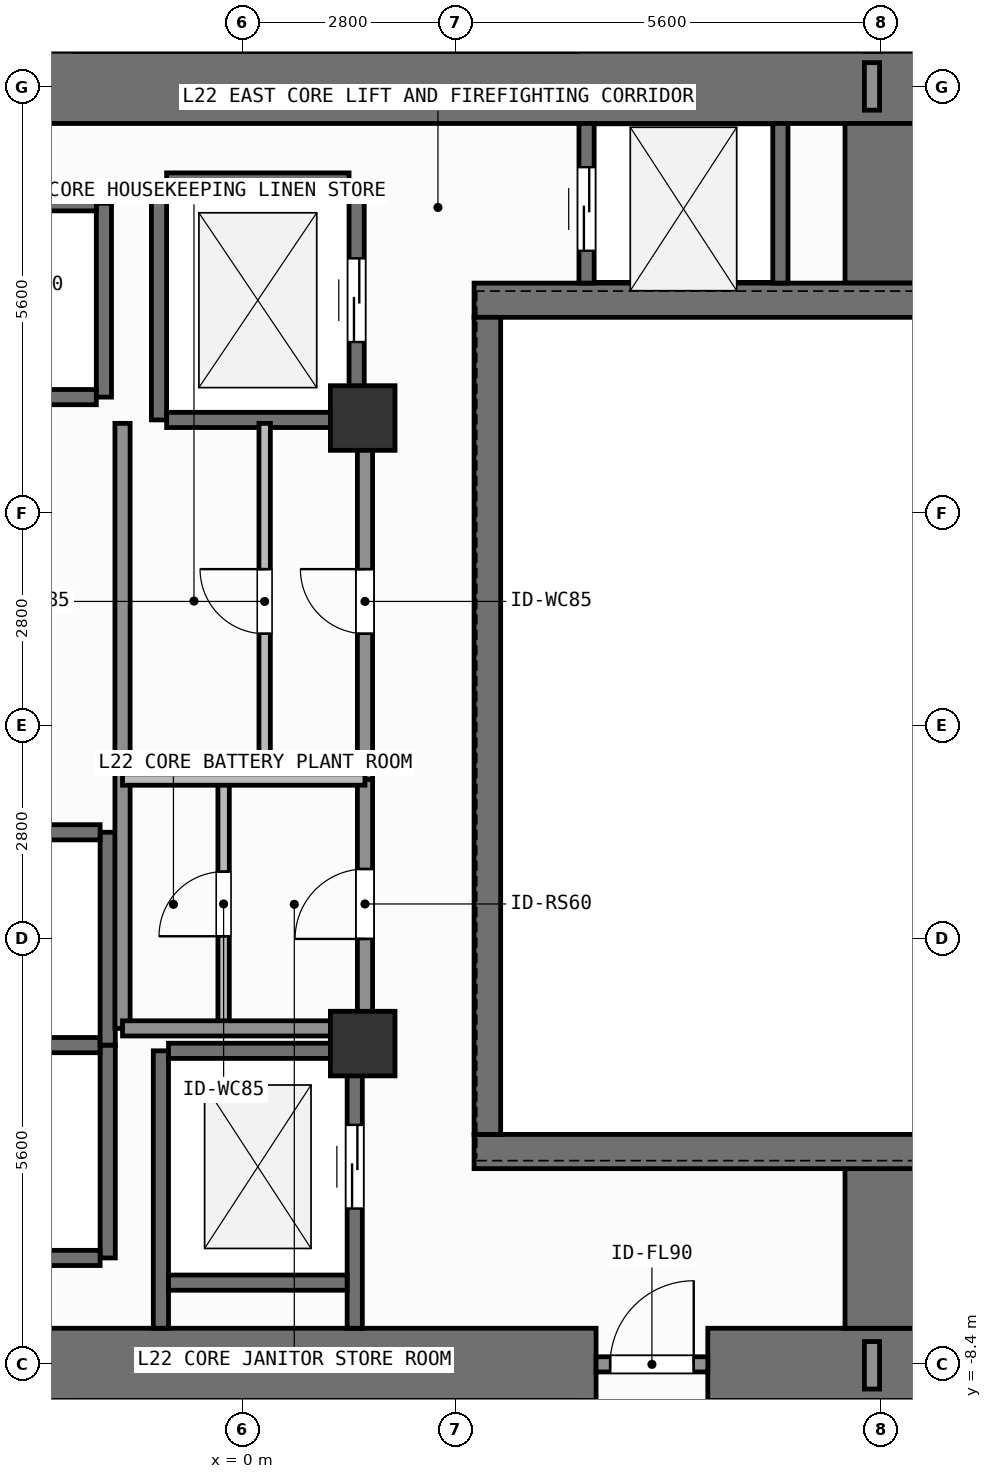
"""IFC4 building model, lengths in metres.
Left out: names, types, materials, properties, quantities, classifications, styles, units other than length and angle.
Written with IfcOpenShell. Run it as: python <this file> out.ifc"""

import sys

from ifc_helpers import new_model, si_unit, direction, frame, frame_2d, origin, origin_2d, place, context, subcontext, project, spatial, rectangle, extrude, element, fill, save


model = new_model("IFC4")
c1 = context("Model", 3, precision=1e-05, world=origin(), true_north=direction((0.0, 1.0)))
c2 = subcontext(c1, "Body", "Model", "MODEL_VIEW")
j1 = project(units=[si_unit("LENGTHUNIT", "METRE"), si_unit("PLANEANGLEUNIT", "RADIAN")], contexts=[c1])
p1 = place(None, origin())
s1 = spatial("IfcSite", under=j1, at=p1, CompositionType="ELEMENT")
p2 = place(p1, origin())
s2 = spatial("IfcBuilding", under=s1, at=p2, CompositionType="ELEMENT")
p3 = place(p2, frame((0.0, 0.0, 89.1)))
s3 = spatial("IfcBuildingStorey", under=s2, at=p3, CompositionType="ELEMENT", Elevation=89.1)
p4 = place(p3, frame((-2.62, -8.4, 0.0), z_axis=(0.0, 0.0, 1.0), x_axis=(1.0, 0.0, 0.0)))
e1 = element("IfcWall", 1, at=p4, inside=s3, PredefinedType="SHEAR", context=c2, shape_type="SweptSolid", body=[
    extrude(rectangle(XDim=7.27, YDim=0.95, at=frame_2d((3.635, 0.0))), origin(), (0.0, 0.0, 1.0), 3.9),
])
p5 = place(p3, frame((6.12, -8.4, 0.0), z_axis=(0.0, 0.0, 1.0), x_axis=(1.0, 0.0, 0.0)))
e2 = element("IfcWall", 2, at=p5, inside=s3, PredefinedType="SHEAR", context=c2, shape_type="SweptSolid", body=[
    extrude(rectangle(XDim=2.755, YDim=0.95, at=frame_2d((1.377, 0.0))), origin(), (0.0, 0.0, 1.0), 3.9),
])
p6 = place(p3, frame((-7.55, 8.4, 0.0), z_axis=(0.0, 0.0, 1.0), x_axis=(1.0, 0.0, 0.0)))
e3 = element("IfcWall", 3, at=p6, inside=s3, PredefinedType="SHEAR", context=c2, shape_type="SweptSolid", body=[
    extrude(rectangle(XDim=16.425, YDim=0.95, at=frame_2d((8.212, 0.0))), origin(), (0.0, 0.0, 1.0), 3.9),
])
for number, where, z_axis, x_axis in (
    (4, (8.4, -7.925, 0.0), (0.0, 0.0, 1.0), (0.0, 1.0, 0.0)),
    (5, (8.4, 5.825, 0.0), (0.0, 0.0, 1.0), (0.0, 1.0, 0.0)),
):
    element("IfcWall", number, at=place(p3, frame(where, z_axis=z_axis, x_axis=x_axis)), inside=s3, PredefinedType="SHEAR", context=c2, shape_type="SweptSolid", body=[
        extrude(rectangle(XDim=2.1, YDim=0.95, at=frame_2d((1.05, 0.0))), origin(), (0.0, 0.0, 1.0), 3.9),
    ])
for number, where, z_axis, x_axis in (
    (6, (3.045, -5.6, 0.0), (0.0, 0.0, 1.0), (1.0, 0.0, 0.0)),
    (7, (3.045, 5.6, 0.0), (0.0, 0.0, 1.0), (1.0, 0.0, 0.0)),
):
    element("IfcWall", number, at=place(p3, frame(where, z_axis=z_axis, x_axis=x_axis)), inside=s3, PredefinedType="SHEAR", context=c2, shape_type="SweptSolid", body=[
        extrude(rectangle(XDim=5.83, YDim=0.45, at=frame_2d((2.915, 0.0))), origin(), (0.0, 0.0, 1.0), 3.9),
    ])
p7 = place(p3, frame((3.22, -5.375, 0.0), z_axis=(0.0, 0.0, 1.0), x_axis=(0.0, 1.0, 0.0)))
e8 = element("IfcWall", 8, at=p7, inside=s3, PredefinedType="SHEAR", context=c2, shape_type="SweptSolid", body=[
    extrude(rectangle(XDim=10.75, YDim=0.35, at=frame_2d((5.375, 0.0))), origin(), (0.0, 0.0, 1.0), 3.9),
])
for number, where, z_axis, x_axis in (
    (9, (1.58, -4.18, 0.0), (0.0, 0.0, 1.0), (1.0, 0.0, 0.0)),
    (10, (1.58, 4.05, 0.0), (0.0, 0.0, 1.0), (1.0, 0.0, 0.0)),
):
    element("IfcColumn", number, at=place(p3, frame(where, z_axis=z_axis, x_axis=x_axis)), inside=s3, PredefinedType="COLUMN", context=c2, shape_type="SweptSolid", body=[
        extrude(rectangle(XDim=0.85, YDim=0.85, at=origin_2d()), origin(), (0.0, 0.0, 1.0), 3.9),
    ])
p8 = place(p3, frame((-1.825, 4.325, 0.0), z_axis=(0.0, 0.0, 1.0), x_axis=(0.0, 1.0, 0.0)))
e11 = element("IfcWall", 11, at=p8, inside=s3, PredefinedType="SHEAR", context=c2, shape_type="SweptSolid", body=[
    extrude(rectangle(XDim=2.55, YDim=0.2, at=frame_2d((1.275, 0.0))), origin(), (0.0, 0.0, 1.0), 3.68),
])
for number, where, z_axis, x_axis in (
    (12, (-4.275, 4.325, 0.0), (0.0, 0.0, 1.0), (1.0, 0.0, 0.0)),
    (13, (-4.275, 6.875, 0.0), (0.0, 0.0, 1.0), (1.0, 0.0, 0.0)),
):
    element("IfcWall", number, at=place(p3, frame(where, z_axis=z_axis, x_axis=x_axis)), inside=s3, PredefinedType="SHEAR", context=c2, shape_type="SweptSolid", body=[
        extrude(rectangle(XDim=2.35, YDim=0.2, at=frame_2d((1.175, 0.0))), origin(), (0.0, 0.0, 1.0), 3.68),
    ])
p9 = place(p3, frame((-1.775, -7.0, 0.0), z_axis=(0.0, 0.0, 1.0), x_axis=(0.0, 1.0, 0.0)))
e14 = element("IfcWall", 14, at=p9, inside=s3, PredefinedType="SHEAR", context=c2, shape_type="SweptSolid", body=[
    extrude(rectangle(XDim=2.8, YDim=0.2, at=frame_2d((1.4, 0.0))), origin(), (0.0, 0.0, 1.0), 3.68),
])
for number, where, z_axis, x_axis in (
    (15, (-4.325, -7.0, 0.0), (0.0, 0.0, 1.0), (1.0, 0.0, 0.0)),
    (16, (-4.325, -4.2, 0.0), (0.0, 0.0, 1.0), (1.0, 0.0, 0.0)),
):
    element("IfcWall", number, at=place(p3, frame(where, z_axis=z_axis, x_axis=x_axis)), inside=s3, PredefinedType="SHEAR", context=c2, shape_type="SweptSolid", body=[
        extrude(rectangle(XDim=2.45, YDim=0.2, at=frame_2d((1.225, 0.0))), origin(), (0.0, 0.0, 1.0), 3.68),
    ])
p10 = place(p3, frame((-1.775, -4.2, 0.0), z_axis=(0.0, 0.0, 1.0), x_axis=(0.0, 1.0, 0.0)))
e17 = element("IfcWall", 17, at=p10, inside=s3, PredefinedType="SHEAR", context=c2, shape_type="SweptSolid", body=[
    extrude(rectangle(XDim=2.8, YDim=0.2, at=frame_2d((1.4, 0.0))), origin(), (0.0, 0.0, 1.0), 3.68),
])
p11 = place(p3, frame((-4.325, -1.4, 0.0), z_axis=(0.0, 0.0, 1.0), x_axis=(1.0, 0.0, 0.0)))
e18 = element("IfcWall", 18, at=p11, inside=s3, PredefinedType="SHEAR", context=c2, shape_type="SweptSolid", body=[
    extrude(rectangle(XDim=2.45, YDim=0.2, at=frame_2d((1.225, 0.0))), origin(), (0.0, 0.0, 1.0), 3.68),
])
p12 = place(p3, frame((-1.1, 4.025, 0.0), z_axis=(0.0, 0.0, 1.0), x_axis=(0.0, 1.0, 0.0)))
e19 = element("IfcWall", 19, at=p12, inside=s3, PredefinedType="SHEAR", context=c2, shape_type="SweptSolid", body=[
    extrude(rectangle(XDim=3.15, YDim=0.2, at=frame_2d((1.575, 0.0))), origin(), (0.0, 0.0, 1.0), 3.68),
])
p13 = place(p3, frame((1.5, 4.025, 0.0), z_axis=(0.0, 0.0, 1.0), x_axis=(0.0, 1.0, 0.0)))
e20 = element("IfcWall", 20, at=p13, inside=s3, PredefinedType="SHEAR", context=c2, shape_type="SweptSolid", body=[
    extrude(rectangle(XDim=3.15, YDim=0.2, at=frame_2d((1.575, 0.0))), origin(), (0.0, 0.0, 1.0), 3.68),
])
p14 = place(p13, frame((1.025, 0.0, 0.0)))
e21 = element("IfcOpeningElement", 21, at=p14, cuts=e20, PredefinedType="OPENING", context=c2, shape_type="SweptSolid", body=[
    extrude(rectangle(XDim=1.1, YDim=2.2, at=frame_2d((0.55, 1.1))), frame((0.0, 0.11, 0.0), z_axis=(0.0, -1.0, 0.0), x_axis=(1.0, 0.0, 0.0)), (0.0, 0.0, 1.0), 0.22),
])
for number, where, z_axis, x_axis in (
    (22, (-1.0, 4.025, 0.0), (0.0, 0.0, 1.0), (1.0, 0.0, 0.0)),
    (23, (-1.0, 7.175, 0.0), (0.0, 0.0, 1.0), (1.0, 0.0, 0.0)),
):
    element("IfcWall", number, at=place(p3, frame(where, z_axis=z_axis, x_axis=x_axis)), inside=s3, PredefinedType="SHEAR", context=c2, shape_type="SweptSolid", body=[
        extrude(rectangle(XDim=2.4, YDim=0.2, at=frame_2d((1.2, 0.0))), origin(), (0.0, 0.0, 1.0), 3.68),
    ])
p15 = place(p3, frame((-1.075, -7.925, 0.0), z_axis=(0.0, 0.0, 1.0), x_axis=(0.0, 1.0, 0.0)))
e24 = element("IfcWall", 24, at=p15, inside=s3, PredefinedType="SHEAR", context=c2, shape_type="SweptSolid", body=[
    extrude(rectangle(XDim=3.65, YDim=0.2, at=frame_2d((1.825, 0.0))), origin(), (0.0, 0.0, 1.0), 3.68),
])
p16 = place(p3, frame((1.475, -7.925, 0.0), z_axis=(0.0, 0.0, 1.0), x_axis=(0.0, 1.0, 0.0)))
e25 = element("IfcWall", 25, at=p16, inside=s3, PredefinedType="SHEAR", context=c2, shape_type="SweptSolid", body=[
    extrude(rectangle(XDim=3.65, YDim=0.2, at=frame_2d((1.825, 0.0))), origin(), (0.0, 0.0, 1.0), 3.68),
])
p17 = place(p16, frame((1.575, 0.0, 0.0)))
e26 = element("IfcOpeningElement", 26, at=p17, cuts=e25, PredefinedType="OPENING", context=c2, shape_type="SweptSolid", body=[
    extrude(rectangle(XDim=1.1, YDim=2.2, at=frame_2d((0.55, 1.1))), frame((0.0, 0.11, 0.0), z_axis=(0.0, -1.0, 0.0), x_axis=(1.0, 0.0, 0.0)), (0.0, 0.0, 1.0), 0.22),
])
for number, where, z_axis, x_axis in (
    (27, (-0.975, -7.325, 0.0), (0.0, 0.0, 1.0), (1.0, 0.0, 0.0)),
    (28, (-0.975, -4.275, 0.0), (0.0, 0.0, 1.0), (1.0, 0.0, 0.0)),
):
    element("IfcWall", number, at=place(p3, frame(where, z_axis=z_axis, x_axis=x_axis)), inside=s3, PredefinedType="SHEAR", context=c2, shape_type="SweptSolid", body=[
        extrude(rectangle(XDim=2.35, YDim=0.2, at=frame_2d((1.175, 0.0))), origin(), (0.0, 0.0, 1.0), 3.68),
    ])
p18 = place(p3, frame((4.525, 5.825, 0.0), z_axis=(0.0, 0.0, 1.0), x_axis=(0.0, 1.0, 0.0)))
e29 = element("IfcWall", 29, at=p18, inside=s3, PredefinedType="SHEAR", context=c2, shape_type="SweptSolid", body=[
    extrude(rectangle(XDim=2.1, YDim=0.2, at=frame_2d((1.05, 0.0))), origin(), (0.0, 0.0, 1.0), 3.68),
])
p19 = place(p18, frame((0.425, 0.0, 0.0)))
e30 = element("IfcOpeningElement", 30, at=p19, cuts=e29, PredefinedType="OPENING", context=c2, shape_type="SweptSolid", body=[
    extrude(rectangle(XDim=1.1, YDim=2.2, at=frame_2d((0.55, 1.1))), frame((0.0, 0.11, 0.0), z_axis=(0.0, -1.0, 0.0), x_axis=(1.0, 0.0, 0.0)), (0.0, 0.0, 1.0), 0.22),
])
p20 = place(p3, frame((7.075, 5.825, 0.0), z_axis=(0.0, 0.0, 1.0), x_axis=(0.0, 1.0, 0.0)))
e31 = element("IfcWall", 31, at=p20, inside=s3, PredefinedType="SHEAR", context=c2, shape_type="SweptSolid", body=[
    extrude(rectangle(XDim=2.1, YDim=0.2, at=frame_2d((1.05, 0.0))), origin(), (0.0, 0.0, 1.0), 3.68),
])
p21 = place(p3, frame((4.65, -8.4, 0.0), z_axis=(0.0, 0.0, 1.0), x_axis=(1.0, 0.0, 0.0)))
e32 = element("IfcWall", 32, at=p21, inside=s3, PredefinedType="SOLIDWALL", context=c2, shape_type="SweptSolid", body=[
    extrude(rectangle(XDim=1.47, YDim=0.2, at=frame_2d((0.735, 0.0))), origin(), (0.0, 0.0, 1.0), 2.72),
])
p22 = place(p21, frame((0.185, 0.0, 0.0)))
e33 = element("IfcOpeningElement", 33, at=p22, cuts=e32, PredefinedType="OPENING", context=c2, shape_type="SweptSolid", body=[
    extrude(rectangle(XDim=1.1, YDim=2.15, at=frame_2d((0.55, 1.075))), frame((0.0, 0.11, 0.0), z_axis=(0.0, -1.0, 0.0), x_axis=(1.0, 0.0, 0.0)), (0.0, 0.0, 1.0), 0.22),
])
p23 = place(p3, frame((-0.25, -3.98, 0.0), z_axis=(0.0, 0.0, 1.0), x_axis=(0.0, 1.0, 0.0)))
e34 = element("IfcWall", 34, at=p23, inside=s3, PredefinedType="PARTITIONING", context=c2, shape_type="SweptSolid", body=[
    extrude(rectangle(XDim=3.274, YDim=0.15, at=frame_2d((1.637, 0.0))), origin(), (0.0, 0.0, 1.0), 3.68),
])
p24 = place(p23, frame((1.212, 0.0, 0.0)))
e35 = element("IfcOpeningElement", 35, at=p24, cuts=e34, PredefinedType="OPENING", context=c2, shape_type="SweptSolid", body=[
    extrude(rectangle(XDim=0.85, YDim=2.1, at=frame_2d((0.425, 1.05))), frame((0.0, 0.085, 0.0), z_axis=(0.0, -1.0, 0.0), x_axis=(1.0, 0.0, 0.0)), (0.0, 0.0, 1.0), 0.17),
])
p25 = place(p3, frame((0.29, -0.706, 0.0), z_axis=(0.0, 0.0, 1.0), x_axis=(0.0, 1.0, 0.0)))
e36 = element("IfcWall", 36, at=p25, inside=s3, PredefinedType="PARTITIONING", context=c2, shape_type="SweptSolid", body=[
    extrude(rectangle(XDim=4.686, YDim=0.15, at=frame_2d((2.343, 0.0))), origin(), (0.0, 0.0, 1.0), 3.68),
])
p26 = place(p25, frame((1.918, 0.0, 0.0)))
e37 = element("IfcOpeningElement", 37, at=p26, cuts=e36, PredefinedType="OPENING", context=c2, shape_type="SweptSolid", body=[
    extrude(rectangle(XDim=0.85, YDim=2.1, at=frame_2d((0.425, 1.05))), frame((0.0, 0.085, 0.0), z_axis=(0.0, -1.0, 0.0), x_axis=(1.0, 0.0, 0.0)), (0.0, 0.0, 1.0), 0.17),
])
p27 = place(p3, frame((1.61, -3.98, 0.0), z_axis=(0.0, 0.0, 1.0), x_axis=(0.0, 1.0, 0.0)))
e38 = element("IfcWall", 38, at=p27, inside=s3, PredefinedType="SOLIDWALL", context=c2, shape_type="SweptSolid", body=[
    extrude(rectangle(XDim=3.274, YDim=0.2, at=frame_2d((1.637, 0.0))), origin(), (0.0, 0.0, 1.0), 3.68),
])
p28 = place(p27, frame((1.177, 0.0, 0.0)))
e39 = element("IfcOpeningElement", 39, at=p28, cuts=e38, PredefinedType="OPENING", context=c2, shape_type="SweptSolid", body=[
    extrude(rectangle(XDim=0.92, YDim=2.1, at=frame_2d((0.46, 1.05))), frame((0.0, 0.11, 0.0), z_axis=(0.0, -1.0, 0.0), x_axis=(1.0, 0.0, 0.0)), (0.0, 0.0, 1.0), 0.22),
])
p29 = place(p3, frame((1.61, -0.706, 0.0), z_axis=(0.0, 0.0, 1.0), x_axis=(0.0, 1.0, 0.0)))
e40 = element("IfcWall", 40, at=p29, inside=s3, PredefinedType="SOLIDWALL", context=c2, shape_type="SweptSolid", body=[
    extrude(rectangle(XDim=4.686, YDim=0.2, at=frame_2d((2.343, 0.0))), origin(), (0.0, 0.0, 1.0), 3.68),
])
p30 = place(p29, frame((1.918, 0.0, 0.0)))
e41 = element("IfcOpeningElement", 41, at=p30, cuts=e40, PredefinedType="OPENING", context=c2, shape_type="SweptSolid", body=[
    extrude(rectangle(XDim=0.85, YDim=2.1, at=frame_2d((0.425, 1.05))), frame((0.0, 0.11, 0.0), z_axis=(0.0, -1.0, 0.0), x_axis=(1.0, 0.0, 0.0)), (0.0, 0.0, 1.0), 0.22),
])
p31 = place(p3, frame((-1.58, -3.98, 0.0), z_axis=(0.0, 0.0, 1.0), x_axis=(0.0, 1.0, 0.0)))
e42 = element("IfcWall", 42, at=p31, inside=s3, PredefinedType="SOLIDWALL", context=c2, shape_type="SweptSolid", body=[
    extrude(rectangle(XDim=7.96, YDim=0.2, at=frame_2d((3.98, 0.0))), origin(), (0.0, 0.0, 1.0), 3.68),
])
p32 = place(p3, frame((-1.58, -3.98, 0.0), z_axis=(0.0, 0.0, 1.0), x_axis=(1.0, 0.0, 0.0)))
e43 = element("IfcWall", 43, at=p32, inside=s3, PredefinedType="SOLIDWALL", context=c2, shape_type="SweptSolid", body=[
    extrude(rectangle(XDim=3.19, YDim=0.2, at=frame_2d((1.595, 0.0))), origin(), (0.0, 0.0, 1.0), 3.68),
])
p33 = place(p3, frame((-1.58, -0.706, 0.0), z_axis=(0.0, 0.0, 1.0), x_axis=(1.0, 0.0, 0.0)))
e44 = element("IfcWall", 44, at=p33, inside=s3, PredefinedType="PARTITIONING", context=c2, shape_type="SweptSolid", body=[
    extrude(rectangle(XDim=3.19, YDim=0.15, at=frame_2d((1.595, 0.0))), origin(), (0.0, 0.0, 1.0), 3.68),
])
for number, where, z_axis, x_axis in (
    (45, (8.28, -8.725, 0.0), (0.0, 0.0, 1.0), (0.0, 1.0, 0.0)),
    (46, (8.28, 8.1, 0.0), (0.0, 0.0, 1.0), (0.0, 1.0, 0.0)),
):
    element("IfcWall", number, at=place(p3, frame(where, z_axis=z_axis, x_axis=x_axis)), inside=s3, PredefinedType="SOLIDWALL", context=c2, shape_type="SweptSolid", body=[
        extrude(rectangle(XDim=0.625, YDim=0.2, at=frame_2d((0.312, 0.0))), origin(), (0.0, 0.0, 1.0), 3.68),
    ])
p34 = place(p14, origin())
e47 = element("IfcDoor", 47, at=p34, inside=s3, OperationType="SLIDING_TO_LEFT", PredefinedType="DOOR", context=c2, shape_type="SweptSolid", body=[
    extrude(rectangle(XDim=1.1, YDim=2.2, at=frame_2d((0.55, 1.1))), frame((0.0, 0.025, 0.0), z_axis=(0.0, -1.0, 0.0), x_axis=(1.0, 0.0, 0.0)), (0.0, 0.0, 1.0), 0.05),
])
fill(e21, e47)
p35 = place(p17, origin())
e48 = element("IfcDoor", 48, at=p35, inside=s3, OperationType="SLIDING_TO_LEFT", PredefinedType="DOOR", context=c2, shape_type="SweptSolid", body=[
    extrude(rectangle(XDim=1.1, YDim=2.2, at=frame_2d((0.55, 1.1))), frame((0.0, 0.025, 0.0), z_axis=(0.0, -1.0, 0.0), x_axis=(1.0, 0.0, 0.0)), (0.0, 0.0, 1.0), 0.05),
])
fill(e26, e48)
p36 = place(p19, origin())
e49 = element("IfcDoor", 49, at=p36, inside=s3, OperationType="SLIDING_TO_LEFT", PredefinedType="DOOR", context=c2, shape_type="SweptSolid", body=[
    extrude(rectangle(XDim=1.1, YDim=2.2, at=frame_2d((0.55, 1.1))), frame((0.0, 0.025, 0.0), z_axis=(0.0, -1.0, 0.0), x_axis=(1.0, 0.0, 0.0)), (0.0, 0.0, 1.0), 0.05),
])
fill(e30, e49)
p37 = place(p22, origin())
e50 = element("IfcDoor", 50, at=p37, inside=s3, OperationType="SINGLE_SWING_RIGHT", PredefinedType="DOOR", context=c2, shape_type="SweptSolid", body=[
    extrude(rectangle(XDim=1.1, YDim=2.15, at=frame_2d((0.55, 1.075))), frame((0.0, 0.025, 0.0), z_axis=(0.0, -1.0, 0.0), x_axis=(1.0, 0.0, 0.0)), (0.0, 0.0, 1.0), 0.05),
])
fill(e33, e50)
p38 = place(p24, origin())
e51 = element("IfcDoor", 51, at=p38, inside=s3, OperationType="SINGLE_SWING_LEFT", PredefinedType="DOOR", context=c2, shape_type="SweptSolid", body=[
    extrude(rectangle(XDim=0.85, YDim=2.1, at=frame_2d((0.425, 1.05))), frame((0.0, 0.025, 0.0), z_axis=(0.0, -1.0, 0.0), x_axis=(1.0, 0.0, 0.0)), (0.0, 0.0, 1.0), 0.05),
])
fill(e35, e51)
p39 = place(p26, origin())
e52 = element("IfcDoor", 52, at=p39, inside=s3, OperationType="SINGLE_SWING_RIGHT", PredefinedType="DOOR", context=c2, shape_type="SweptSolid", body=[
    extrude(rectangle(XDim=0.85, YDim=2.1, at=frame_2d((0.425, 1.05))), frame((0.0, 0.025, 0.0), z_axis=(0.0, -1.0, 0.0), x_axis=(1.0, 0.0, 0.0)), (0.0, 0.0, 1.0), 0.05),
])
fill(e37, e52)
p40 = place(p28, origin())
e53 = element("IfcDoor", 53, at=p40, inside=s3, OperationType="SINGLE_SWING_LEFT", PredefinedType="DOOR", context=c2, shape_type="SweptSolid", body=[
    extrude(rectangle(XDim=0.92, YDim=2.1, at=frame_2d((0.46, 1.05))), frame((0.0, 0.025, 0.0), z_axis=(0.0, -1.0, 0.0), x_axis=(1.0, 0.0, 0.0)), (0.0, 0.0, 1.0), 0.05),
])
fill(e39, e53)
p41 = place(p30, origin())
e54 = element("IfcDoor", 54, at=p41, inside=s3, OperationType="SINGLE_SWING_RIGHT", PredefinedType="DOOR", context=c2, shape_type="SweptSolid", body=[
    extrude(rectangle(XDim=0.85, YDim=2.1, at=frame_2d((0.425, 1.05))), frame((0.0, 0.025, 0.0), z_axis=(0.0, -1.0, 0.0), x_axis=(1.0, 0.0, 0.0)), (0.0, 0.0, 1.0), 0.05),
])
fill(e41, e54)
save(model, sys.argv[1])
